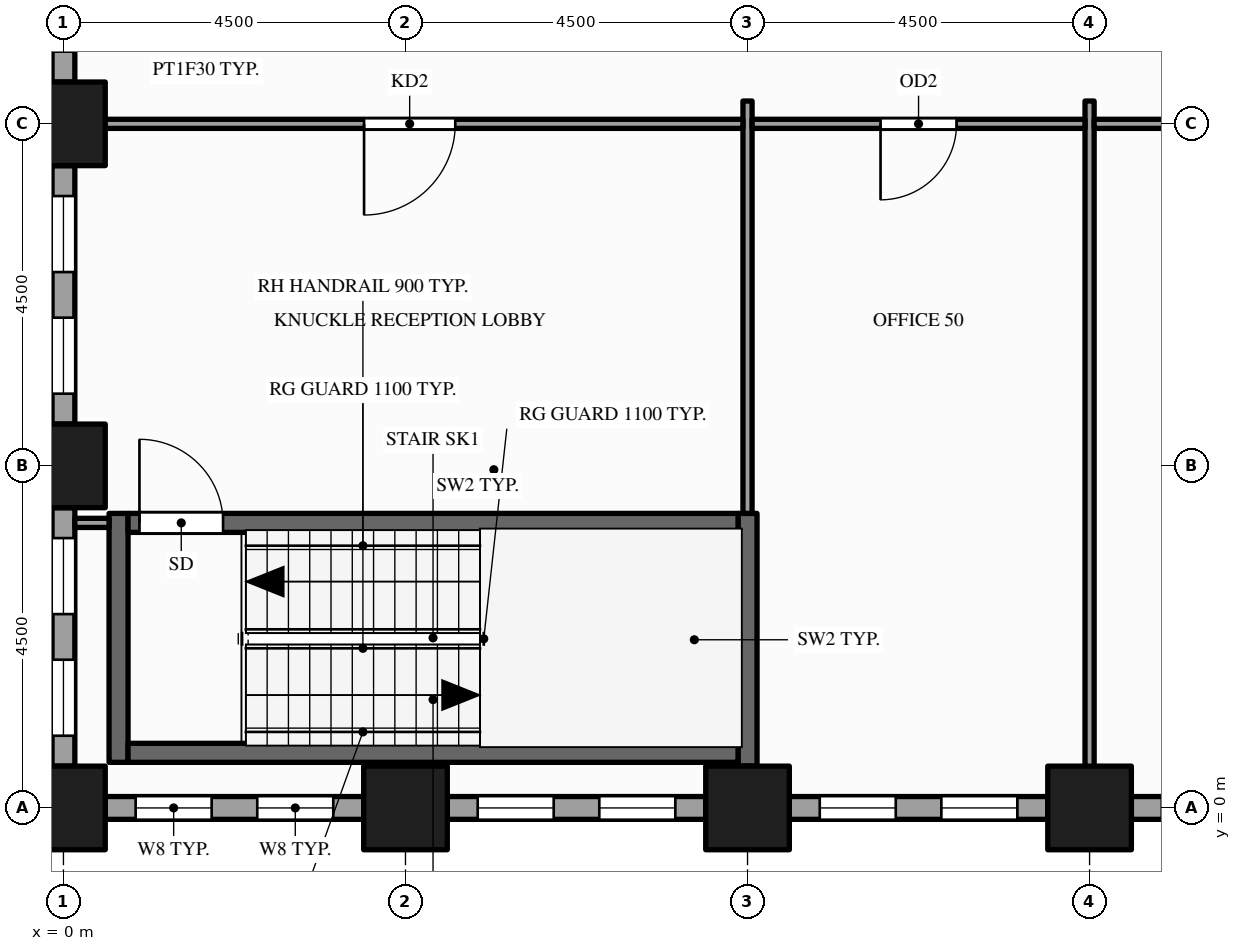
"""IFC4 building model, lengths in metres.
Left out: names, types, materials, properties, quantities, classifications, styles, units other than length and angle.
Written with IfcOpenShell. Run it as: python <this file> out.ifc"""

import sys

from ifc_helpers import new_model, si_unit, direction, frame, frame_2d, origin, origin_2d, place, context, subcontext, project, spatial, rectangle, hollow_rectangle, extrude, element, fill, save


model = new_model("IFC4")
c1 = context("Model", 3, precision=1e-05, world=origin(), true_north=direction((0.0, 1.0)))
c2 = subcontext(c1, "Body", "Model", "MODEL_VIEW")
j1 = project(units=[si_unit("LENGTHUNIT", "METRE"), si_unit("PLANEANGLEUNIT", "RADIAN")], contexts=[c1])
p1 = place(None, origin())
s1 = spatial("IfcSite", under=j1, at=p1, CompositionType="ELEMENT")
p2 = place(p1, origin())
s2 = spatial("IfcBuilding", under=s1, at=p2, CompositionType="ELEMENT")
p3 = place(p2, frame((0.0, 0.0, 33.0)))
s3 = spatial("IfcBuildingStorey", under=s2, at=p3, CompositionType="ELEMENT", Elevation=33.0)
for number, where, z_axis, x_axis in (
    (1, (0.0, 0.0, -0.15), (0.0, 0.0, 1.0), (1.0, 0.0, 0.0)),
    (2, (0.0, 4.5, -0.15), (0.0, 0.0, 1.0), (1.0, 0.0, 0.0)),
    (3, (0.0, 9.0, -0.15), (0.0, 0.0, 1.0), (1.0, 0.0, 0.0)),
    (4, (4.5, 0.0, -0.15), (0.0, 0.0, 1.0), (1.0, 0.0, 0.0)),
    (5, (9.0, 0.0, -0.15), (0.0, 0.0, 1.0), (1.0, 0.0, 0.0)),
    (6, (13.5, 0.0, -0.15), (0.0, 0.0, 1.0), (1.0, 0.0, 0.0)),
):
    element("IfcColumn", number, at=place(p3, frame(where, z_axis=z_axis, x_axis=x_axis)), inside=s3, PredefinedType="COLUMN", context=c2, shape_type="SweptSolid", body=[
        extrude(hollow_rectangle(XDim=1.1, YDim=1.1, WallThickness=0.06, at=origin_2d()), origin(), (0.0, 0.0, 1.0), 4.0),
    ])
p4 = place(p3, frame((0.55, 0.0, 0.0), z_axis=(0.0, 0.0, 1.0), x_axis=(1.0, 0.0, 0.0)))
e7 = element("IfcWall", 7, at=p4, inside=s3, PredefinedType="STANDARD", context=c2, shape_type="SweptSolid", body=[
    extrude(rectangle(XDim=3.4, YDim=0.3, at=frame_2d((1.7, 0.0))), origin(), (0.0, 0.0, 1.0), 3.144),
])
p5 = place(p4, frame((0.4, 0.0, 0.9)))
e8 = element("IfcOpeningElement", 8, at=p5, cuts=e7, PredefinedType="OPENING", context=c2, shape_type="SweptSolid", body=[
    extrude(rectangle(XDim=1.0, YDim=2.0, at=frame_2d((0.5, 1.0))), frame((0.0, 0.16, 0.0), z_axis=(0.0, -1.0, 0.0), x_axis=(1.0, 0.0, 0.0)), (0.0, 0.0, 1.0), 0.32),
])
p6 = place(p4, frame((2.0, 0.0, 0.9)))
e9 = element("IfcOpeningElement", 9, at=p6, cuts=e7, PredefinedType="OPENING", context=c2, shape_type="SweptSolid", body=[
    extrude(rectangle(XDim=1.0, YDim=2.0, at=frame_2d((0.5, 1.0))), frame((0.0, 0.16, 0.0), z_axis=(0.0, -1.0, 0.0), x_axis=(1.0, 0.0, 0.0)), (0.0, 0.0, 1.0), 0.32),
])
p7 = place(p3, frame((5.05, 0.0, 0.0), z_axis=(0.0, 0.0, 1.0), x_axis=(1.0, 0.0, 0.0)))
e10 = element("IfcWall", 10, at=p7, inside=s3, PredefinedType="STANDARD", context=c2, shape_type="SweptSolid", body=[
    extrude(rectangle(XDim=3.4, YDim=0.3, at=frame_2d((1.7, 0.0))), origin(), (0.0, 0.0, 1.0), 3.144),
])
p8 = place(p7, frame((0.4, 0.0, 0.9)))
e11 = element("IfcOpeningElement", 11, at=p8, cuts=e10, PredefinedType="OPENING", context=c2, shape_type="SweptSolid", body=[
    extrude(rectangle(XDim=1.0, YDim=2.0, at=frame_2d((0.5, 1.0))), frame((0.0, 0.16, 0.0), z_axis=(0.0, -1.0, 0.0), x_axis=(1.0, 0.0, 0.0)), (0.0, 0.0, 1.0), 0.32),
])
p9 = place(p7, frame((2.0, 0.0, 0.9)))
e12 = element("IfcOpeningElement", 12, at=p9, cuts=e10, PredefinedType="OPENING", context=c2, shape_type="SweptSolid", body=[
    extrude(rectangle(XDim=1.0, YDim=2.0, at=frame_2d((0.5, 1.0))), frame((0.0, 0.16, 0.0), z_axis=(0.0, -1.0, 0.0), x_axis=(1.0, 0.0, 0.0)), (0.0, 0.0, 1.0), 0.32),
])
p10 = place(p3, frame((9.55, 0.0, 0.0), z_axis=(0.0, 0.0, 1.0), x_axis=(1.0, 0.0, 0.0)))
e13 = element("IfcWall", 13, at=p10, inside=s3, PredefinedType="STANDARD", context=c2, shape_type="SweptSolid", body=[
    extrude(rectangle(XDim=3.4, YDim=0.3, at=frame_2d((1.7, 0.0))), origin(), (0.0, 0.0, 1.0), 3.144),
])
p11 = place(p10, frame((0.4, 0.0, 0.9)))
e14 = element("IfcOpeningElement", 14, at=p11, cuts=e13, PredefinedType="OPENING", context=c2, shape_type="SweptSolid", body=[
    extrude(rectangle(XDim=1.0, YDim=2.0, at=frame_2d((0.5, 1.0))), frame((0.0, 0.16, 0.0), z_axis=(0.0, -1.0, 0.0), x_axis=(1.0, 0.0, 0.0)), (0.0, 0.0, 1.0), 0.32),
])
p12 = place(p10, frame((2.0, 0.0, 0.9)))
e15 = element("IfcOpeningElement", 15, at=p12, cuts=e13, PredefinedType="OPENING", context=c2, shape_type="SweptSolid", body=[
    extrude(rectangle(XDim=1.0, YDim=2.0, at=frame_2d((0.5, 1.0))), frame((0.0, 0.16, 0.0), z_axis=(0.0, -1.0, 0.0), x_axis=(1.0, 0.0, 0.0)), (0.0, 0.0, 1.0), 0.32),
])
p13 = place(p3, frame((14.05, 0.0, 0.0), z_axis=(0.0, 0.0, 1.0), x_axis=(1.0, 0.0, 0.0)))
e16 = element("IfcWall", 16, at=p13, inside=s3, PredefinedType="STANDARD", context=c2, shape_type="SweptSolid", body=[
    extrude(rectangle(XDim=3.4, YDim=0.3, at=frame_2d((1.7, 0.0))), origin(), (0.0, 0.0, 1.0), 3.144),
])
p14 = place(p13, frame((0.4, 0.0, 0.9)))
e17 = element("IfcOpeningElement", 17, at=p14, cuts=e16, PredefinedType="OPENING", context=c2, shape_type="SweptSolid", body=[
    extrude(rectangle(XDim=1.0, YDim=2.0, at=frame_2d((0.5, 1.0))), frame((0.0, 0.16, 0.0), z_axis=(0.0, -1.0, 0.0), x_axis=(1.0, 0.0, 0.0)), (0.0, 0.0, 1.0), 0.32),
])
p15 = place(p13, frame((2.0, 0.0, 0.9)))
e18 = element("IfcOpeningElement", 18, at=p15, cuts=e16, PredefinedType="OPENING", context=c2, shape_type="SweptSolid", body=[
    extrude(rectangle(XDim=1.0, YDim=2.0, at=frame_2d((0.5, 1.0))), frame((0.0, 0.16, 0.0), z_axis=(0.0, -1.0, 0.0), x_axis=(1.0, 0.0, 0.0)), (0.0, 0.0, 1.0), 0.32),
])
p16 = place(p3, frame((0.0, 12.95, 0.0), z_axis=(0.0, 0.0, 1.0), x_axis=(0.0, -1.0, 0.0)))
e19 = element("IfcWall", 19, at=p16, inside=s3, PredefinedType="STANDARD", context=c2, shape_type="SweptSolid", body=[
    extrude(rectangle(XDim=3.4, YDim=0.3, at=frame_2d((1.7, 0.0))), origin(), (0.0, 0.0, 1.0), 3.144),
])
p17 = place(p16, frame((0.4, 0.0, 0.9)))
e20 = element("IfcOpeningElement", 20, at=p17, cuts=e19, PredefinedType="OPENING", context=c2, shape_type="SweptSolid", body=[
    extrude(rectangle(XDim=1.0, YDim=2.0, at=frame_2d((0.5, 1.0))), frame((0.0, 0.16, 0.0), z_axis=(0.0, -1.0, 0.0), x_axis=(1.0, 0.0, 0.0)), (0.0, 0.0, 1.0), 0.32),
])
p18 = place(p16, frame((2.0, 0.0, 0.9)))
e21 = element("IfcOpeningElement", 21, at=p18, cuts=e19, PredefinedType="OPENING", context=c2, shape_type="SweptSolid", body=[
    extrude(rectangle(XDim=1.0, YDim=2.0, at=frame_2d((0.5, 1.0))), frame((0.0, 0.16, 0.0), z_axis=(0.0, -1.0, 0.0), x_axis=(1.0, 0.0, 0.0)), (0.0, 0.0, 1.0), 0.32),
])
p19 = place(p3, frame((0.0, 8.45, 0.0), z_axis=(0.0, 0.0, 1.0), x_axis=(0.0, -1.0, 0.0)))
e22 = element("IfcWall", 22, at=p19, inside=s3, PredefinedType="STANDARD", context=c2, shape_type="SweptSolid", body=[
    extrude(rectangle(XDim=3.4, YDim=0.3, at=frame_2d((1.7, 0.0))), origin(), (0.0, 0.0, 1.0), 3.144),
])
p20 = place(p19, frame((0.4, 0.0, 0.9)))
e23 = element("IfcOpeningElement", 23, at=p20, cuts=e22, PredefinedType="OPENING", context=c2, shape_type="SweptSolid", body=[
    extrude(rectangle(XDim=1.0, YDim=2.0, at=frame_2d((0.5, 1.0))), frame((0.0, 0.16, 0.0), z_axis=(0.0, -1.0, 0.0), x_axis=(1.0, 0.0, 0.0)), (0.0, 0.0, 1.0), 0.32),
])
p21 = place(p19, frame((2.0, 0.0, 0.9)))
e24 = element("IfcOpeningElement", 24, at=p21, cuts=e22, PredefinedType="OPENING", context=c2, shape_type="SweptSolid", body=[
    extrude(rectangle(XDim=1.0, YDim=2.0, at=frame_2d((0.5, 1.0))), frame((0.0, 0.16, 0.0), z_axis=(0.0, -1.0, 0.0), x_axis=(1.0, 0.0, 0.0)), (0.0, 0.0, 1.0), 0.32),
])
p22 = place(p3, frame((0.0, 3.95, 0.0), z_axis=(0.0, 0.0, 1.0), x_axis=(0.0, -1.0, 0.0)))
e25 = element("IfcWall", 25, at=p22, inside=s3, PredefinedType="STANDARD", context=c2, shape_type="SweptSolid", body=[
    extrude(rectangle(XDim=3.4, YDim=0.3, at=frame_2d((1.7, 0.0))), origin(), (0.0, 0.0, 1.0), 3.144),
])
p23 = place(p22, frame((0.4, 0.0, 0.9)))
e26 = element("IfcOpeningElement", 26, at=p23, cuts=e25, PredefinedType="OPENING", context=c2, shape_type="SweptSolid", body=[
    extrude(rectangle(XDim=1.0, YDim=2.0, at=frame_2d((0.5, 1.0))), frame((0.0, 0.16, 0.0), z_axis=(0.0, -1.0, 0.0), x_axis=(1.0, 0.0, 0.0)), (0.0, 0.0, 1.0), 0.32),
])
p24 = place(p22, frame((2.0, 0.0, 0.9)))
e27 = element("IfcOpeningElement", 27, at=p24, cuts=e25, PredefinedType="OPENING", context=c2, shape_type="SweptSolid", body=[
    extrude(rectangle(XDim=1.0, YDim=2.0, at=frame_2d((0.5, 1.0))), frame((0.0, 0.16, 0.0), z_axis=(0.0, -1.0, 0.0), x_axis=(1.0, 0.0, 0.0)), (0.0, 0.0, 1.0), 0.32),
])
p25 = place(p3, frame((0.725, 0.6, 0.0), z_axis=(0.0, 0.0, 1.0), x_axis=(0.0, 1.0, 0.0)))
e28 = element("IfcWall", 28, at=p25, inside=s3, PredefinedType="SHEAR", context=c2, shape_type="SweptSolid", body=[
    extrude(rectangle(XDim=3.275, YDim=0.25, at=frame_2d((1.637, 0.0))), origin(), (0.0, 0.0, 1.0), 3.85),
])
p26 = place(p3, frame((9.0, 0.15, 0.0), z_axis=(0.0, 0.0, 1.0), x_axis=(0.0, 1.0, 0.0)))
e29 = element("IfcWall", 29, at=p26, inside=s3, PredefinedType="PARTITIONING", context=c2, shape_type="SweptSolid", body=[
    extrude(rectangle(XDim=0.4, YDim=0.12, at=frame_2d((0.2, 0.0))), origin(), (0.0, 0.0, 1.0), 3.85),
])
p27 = place(p3, frame((9.0, 0.55, 0.0), z_axis=(0.0, 0.0, 1.0), x_axis=(0.0, 1.0, 0.0)))
e30 = element("IfcWall", 30, at=p27, inside=s3, PredefinedType="SHEAR", context=c2, shape_type="SweptSolid", body=[
    extrude(rectangle(XDim=3.325, YDim=0.25, at=frame_2d((1.663, 0.0))), origin(), (0.0, 0.0, 1.0), 3.85),
])
p28 = place(p3, frame((9.0, 3.875, 0.0), z_axis=(0.0, 0.0, 1.0), x_axis=(0.0, 1.0, 0.0)))
e31 = element("IfcWall", 31, at=p28, inside=s3, PredefinedType="PARTITIONING", context=c2, shape_type="SweptSolid", body=[
    extrude(rectangle(XDim=5.425, YDim=0.12, at=frame_2d((2.712, 0.0))), origin(), (0.0, 0.0, 1.0), 2.938),
])
p29 = place(p3, frame((13.5, 0.15, 0.0), z_axis=(0.0, 0.0, 1.0), x_axis=(0.0, 1.0, 0.0)))
e32 = element("IfcWall", 32, at=p29, inside=s3, PredefinedType="PARTITIONING", context=c2, shape_type="SweptSolid", body=[
    extrude(rectangle(XDim=9.15, YDim=0.12, at=frame_2d((4.575, 0.0))), origin(), (0.0, 0.0, 1.0), 2.938),
])
p30 = place(p3, frame((0.85, 0.725, 0.0), z_axis=(0.0, 0.0, 1.0), x_axis=(1.0, 0.0, 0.0)))
e33 = element("IfcWall", 33, at=p30, inside=s3, PredefinedType="SHEAR", context=c2, shape_type="SweptSolid", body=[
    extrude(rectangle(XDim=8.025, YDim=0.25, at=frame_2d((4.012, 0.0))), origin(), (0.0, 0.0, 1.0), 3.85),
])
p31 = place(p3, frame((0.15, 3.75, 0.0), z_axis=(0.0, 0.0, 1.0), x_axis=(1.0, 0.0, 0.0)))
e34 = element("IfcWall", 34, at=p31, inside=s3, PredefinedType="PARTITIONING", context=c2, shape_type="SweptSolid", body=[
    extrude(rectangle(XDim=0.45, YDim=0.12, at=frame_2d((0.225, 0.0))), origin(), (0.0, 0.0, 1.0), 3.144),
])
p32 = place(p3, frame((0.85, 3.75, 0.0), z_axis=(0.0, 0.0, 1.0), x_axis=(1.0, 0.0, 0.0)))
e35 = element("IfcWall", 35, at=p32, inside=s3, PredefinedType="SHEAR", context=c2, shape_type="SweptSolid", body=[
    extrude(rectangle(XDim=8.025, YDim=0.25, at=frame_2d((4.012, 0.0))), origin(), (0.0, 0.0, 1.0), 3.85),
])
p33 = place(p32, frame((0.15, 0.0, 0.0)))
e36 = element("IfcOpeningElement", 36, at=p33, cuts=e35, PredefinedType="OPENING", context=c2, shape_type="SweptSolid", body=[
    extrude(rectangle(XDim=1.1, YDim=2.1, at=frame_2d((0.55, 1.05))), frame((0.0, 0.135, 0.0), z_axis=(0.0, -1.0, 0.0), x_axis=(1.0, 0.0, 0.0)), (0.0, 0.0, 1.0), 0.27),
])
p34 = place(p3, frame((0.15, 9.0, 0.0), z_axis=(0.0, 0.0, 1.0), x_axis=(1.0, 0.0, 0.0)))
e37 = element("IfcWall", 37, at=p34, inside=s3, PredefinedType="PARTITIONING", context=c2, shape_type="SweptSolid", body=[
    extrude(rectangle(XDim=8.79, YDim=0.12, at=frame_2d((4.395, 0.0))), origin(), (0.0, 0.0, 1.0), 2.938),
])
p35 = place(p34, frame((3.805, 0.0, 0.0)))
e38 = element("IfcOpeningElement", 38, at=p35, cuts=e37, PredefinedType="OPENING", context=c2, shape_type="SweptSolid", body=[
    extrude(rectangle(XDim=1.2, YDim=2.1, at=frame_2d((0.6, 1.05))), frame((0.0, 0.07, 0.0), z_axis=(0.0, -1.0, 0.0), x_axis=(1.0, 0.0, 0.0)), (0.0, 0.0, 1.0), 0.14),
])
p36 = place(p3, frame((9.06, 9.0, 0.0), z_axis=(0.0, 0.0, 1.0), x_axis=(1.0, 0.0, 0.0)))
e39 = element("IfcWall", 39, at=p36, inside=s3, PredefinedType="PARTITIONING", context=c2, shape_type="SweptSolid", body=[
    extrude(rectangle(XDim=4.38, YDim=0.12, at=frame_2d((2.19, 0.0))), origin(), (0.0, 0.0, 1.0), 2.938),
])
p37 = place(p36, frame((1.69, 0.0, 0.0)))
e40 = element("IfcOpeningElement", 40, at=p37, cuts=e39, PredefinedType="OPENING", context=c2, shape_type="SweptSolid", body=[
    extrude(rectangle(XDim=1.0, YDim=2.1, at=frame_2d((0.5, 1.05))), frame((0.0, 0.07, 0.0), z_axis=(0.0, -1.0, 0.0), x_axis=(1.0, 0.0, 0.0)), (0.0, 0.0, 1.0), 0.14),
])
p38 = place(p3, frame((13.56, 9.0, 0.0), z_axis=(0.0, 0.0, 1.0), x_axis=(1.0, 0.0, 0.0)))
e41 = element("IfcWall", 41, at=p38, inside=s3, PredefinedType="PARTITIONING", context=c2, shape_type="SweptSolid", body=[
    extrude(rectangle(XDim=6.63, YDim=0.12, at=frame_2d((3.315, 0.0))), origin(), (0.0, 0.0, 1.0), 2.938),
])
p39 = place(p38, frame((2.865, 0.0, 0.0)))
e42 = element("IfcOpeningElement", 42, at=p39, cuts=e41, PredefinedType="OPENING", context=c2, shape_type="SweptSolid", body=[
    extrude(rectangle(XDim=0.9, YDim=2.1, at=frame_2d((0.45, 1.05))), frame((0.0, 0.07, 0.0), z_axis=(0.0, -1.0, 0.0), x_axis=(1.0, 0.0, 0.0)), (0.0, 0.0, 1.0), 0.14),
])
p40 = place(p5, origin())
e43 = element("IfcWindow", 43, at=p40, inside=s3, PartitioningType="SINGLE_PANEL", PredefinedType="WINDOW", context=c2, shape_type="SweptSolid", body=[
    extrude(rectangle(XDim=1.0, YDim=2.0, at=frame_2d((0.5, 1.0))), frame((0.0, 0.03, 0.0), z_axis=(0.0, -1.0, 0.0), x_axis=(1.0, 0.0, 0.0)), (0.0, 0.0, 1.0), 0.06),
])
fill(e8, e43)
p41 = place(p6, origin())
e44 = element("IfcWindow", 44, at=p41, inside=s3, PartitioningType="SINGLE_PANEL", PredefinedType="WINDOW", context=c2, shape_type="SweptSolid", body=[
    extrude(rectangle(XDim=1.0, YDim=2.0, at=frame_2d((0.5, 1.0))), frame((0.0, 0.03, 0.0), z_axis=(0.0, -1.0, 0.0), x_axis=(1.0, 0.0, 0.0)), (0.0, 0.0, 1.0), 0.06),
])
fill(e9, e44)
p42 = place(p8, origin())
e45 = element("IfcWindow", 45, at=p42, inside=s3, PartitioningType="SINGLE_PANEL", PredefinedType="WINDOW", context=c2, shape_type="SweptSolid", body=[
    extrude(rectangle(XDim=1.0, YDim=2.0, at=frame_2d((0.5, 1.0))), frame((0.0, 0.03, 0.0), z_axis=(0.0, -1.0, 0.0), x_axis=(1.0, 0.0, 0.0)), (0.0, 0.0, 1.0), 0.06),
])
fill(e11, e45)
p43 = place(p9, origin())
e46 = element("IfcWindow", 46, at=p43, inside=s3, PartitioningType="SINGLE_PANEL", PredefinedType="WINDOW", context=c2, shape_type="SweptSolid", body=[
    extrude(rectangle(XDim=1.0, YDim=2.0, at=frame_2d((0.5, 1.0))), frame((0.0, 0.03, 0.0), z_axis=(0.0, -1.0, 0.0), x_axis=(1.0, 0.0, 0.0)), (0.0, 0.0, 1.0), 0.06),
])
fill(e12, e46)
p44 = place(p11, origin())
e47 = element("IfcWindow", 47, at=p44, inside=s3, PartitioningType="SINGLE_PANEL", PredefinedType="WINDOW", context=c2, shape_type="SweptSolid", body=[
    extrude(rectangle(XDim=1.0, YDim=2.0, at=frame_2d((0.5, 1.0))), frame((0.0, 0.03, 0.0), z_axis=(0.0, -1.0, 0.0), x_axis=(1.0, 0.0, 0.0)), (0.0, 0.0, 1.0), 0.06),
])
fill(e14, e47)
p45 = place(p12, origin())
e48 = element("IfcWindow", 48, at=p45, inside=s3, PartitioningType="SINGLE_PANEL", PredefinedType="WINDOW", context=c2, shape_type="SweptSolid", body=[
    extrude(rectangle(XDim=1.0, YDim=2.0, at=frame_2d((0.5, 1.0))), frame((0.0, 0.03, 0.0), z_axis=(0.0, -1.0, 0.0), x_axis=(1.0, 0.0, 0.0)), (0.0, 0.0, 1.0), 0.06),
])
fill(e15, e48)
p46 = place(p20, origin())
e49 = element("IfcWindow", 49, at=p46, inside=s3, PartitioningType="SINGLE_PANEL", PredefinedType="WINDOW", context=c2, shape_type="SweptSolid", body=[
    extrude(rectangle(XDim=1.0, YDim=2.0, at=frame_2d((0.5, 1.0))), frame((0.0, 0.03, 0.0), z_axis=(0.0, -1.0, 0.0), x_axis=(1.0, 0.0, 0.0)), (0.0, 0.0, 1.0), 0.06),
])
fill(e23, e49)
p47 = place(p21, origin())
e50 = element("IfcWindow", 50, at=p47, inside=s3, PartitioningType="SINGLE_PANEL", PredefinedType="WINDOW", context=c2, shape_type="SweptSolid", body=[
    extrude(rectangle(XDim=1.0, YDim=2.0, at=frame_2d((0.5, 1.0))), frame((0.0, 0.03, 0.0), z_axis=(0.0, -1.0, 0.0), x_axis=(1.0, 0.0, 0.0)), (0.0, 0.0, 1.0), 0.06),
])
fill(e24, e50)
p48 = place(p23, origin())
e51 = element("IfcWindow", 51, at=p48, inside=s3, PartitioningType="SINGLE_PANEL", PredefinedType="WINDOW", context=c2, shape_type="SweptSolid", body=[
    extrude(rectangle(XDim=1.0, YDim=2.0, at=frame_2d((0.5, 1.0))), frame((0.0, 0.03, 0.0), z_axis=(0.0, -1.0, 0.0), x_axis=(1.0, 0.0, 0.0)), (0.0, 0.0, 1.0), 0.06),
])
fill(e26, e51)
p49 = place(p24, origin())
e52 = element("IfcWindow", 52, at=p49, inside=s3, PartitioningType="SINGLE_PANEL", PredefinedType="WINDOW", context=c2, shape_type="SweptSolid", body=[
    extrude(rectangle(XDim=1.0, YDim=2.0, at=frame_2d((0.5, 1.0))), frame((0.0, 0.03, 0.0), z_axis=(0.0, -1.0, 0.0), x_axis=(1.0, 0.0, 0.0)), (0.0, 0.0, 1.0), 0.06),
])
fill(e27, e52)
p50 = place(p33, origin())
e53 = element("IfcDoor", 53, at=p50, inside=s3, OperationType="SINGLE_SWING_LEFT", PredefinedType="DOOR", context=c2, shape_type="SweptSolid", body=[
    extrude(rectangle(XDim=1.1, YDim=2.1, at=frame_2d((0.55, 1.05))), frame((0.0, 0.025, 0.0), z_axis=(0.0, -1.0, 0.0), x_axis=(1.0, 0.0, 0.0)), (0.0, 0.0, 1.0), 0.05),
])
fill(e36, e53)
p51 = place(p35, origin())
e54 = element("IfcDoor", 54, at=p51, inside=s3, OperationType="SINGLE_SWING_LEFT", PredefinedType="DOOR", context=c2, shape_type="SweptSolid", body=[
    extrude(rectangle(XDim=1.2, YDim=2.1, at=frame_2d((0.6, 1.05))), frame((0.0, 0.025, 0.0), z_axis=(0.0, -1.0, 0.0), x_axis=(1.0, 0.0, 0.0)), (0.0, 0.0, 1.0), 0.05),
])
fill(e38, e54)
p52 = place(p37, origin())
e55 = element("IfcDoor", 55, at=p52, inside=s3, OperationType="SINGLE_SWING_LEFT", PredefinedType="DOOR", context=c2, shape_type="SweptSolid", body=[
    extrude(rectangle(XDim=1.0, YDim=2.1, at=frame_2d((0.5, 1.05))), frame((0.0, 0.025, 0.0), z_axis=(0.0, -1.0, 0.0), x_axis=(1.0, 0.0, 0.0)), (0.0, 0.0, 1.0), 0.05),
])
fill(e40, e55)
save(model, sys.argv[1])
